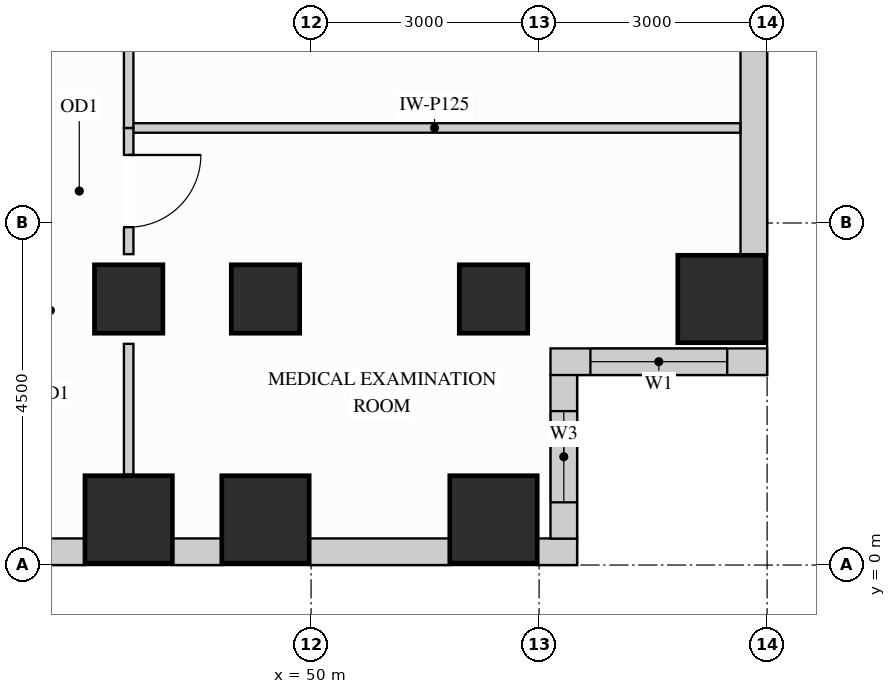
"""IFC4 building model, lengths in metres.
Left out: names, types, materials, properties, quantities, classifications, styles, units other than length and angle.
Written with IfcOpenShell. Run it as: python <this file> out.ifc"""

import sys

from ifc_helpers import new_model, si_unit, direction, frame, frame_2d, origin, origin_2d, place, context, subcontext, project, spatial, rectangle, extrude, source, transform, mapped, element, fill, save


model = new_model("IFC4")
c1 = context("Model", 3, precision=1e-05, world=origin(), true_north=direction((0.0, 1.0)))
c2 = subcontext(c1, "Body", "Model", "MODEL_VIEW")
j1 = project(units=[si_unit("LENGTHUNIT", "METRE"), si_unit("PLANEANGLEUNIT", "RADIAN")], contexts=[c1])
p1 = place(None, origin())
s1 = spatial("IfcSite", under=j1, at=p1, CompositionType="ELEMENT")
p2 = place(p1, origin())
s2 = spatial("IfcBuilding", under=s1, at=p2, CompositionType="ELEMENT")
p3 = place(p2, frame((0.0, 0.0, 117.0)))
s3 = spatial("IfcBuildingStorey", under=s2, at=p3, CompositionType="ELEMENT", Elevation=117.0)
m1 = source(origin(), c2, "Body", "SweptSolid", [
    extrude(rectangle(XDim=0.9, YDim=0.9, at=origin_2d()), origin(), (0.0, 0.0, 1.0), 3.38),
])
for number, where, z_axis, x_axis in (
    (1, (47.6, 3.5, 0.0), (0.0, 0.0, 1.0), (1.0, 0.0, 0.0)),
    (2, (49.4, 3.5, 0.0), (0.0, 0.0, 1.0), (1.0, 0.0, 0.0)),
    (3, (52.4, 3.5, 0.0), (0.0, 0.0, 1.0), (1.0, 0.0, 0.0)),
):
    element("IfcColumn", number, at=place(p3, frame(where, z_axis=z_axis, x_axis=x_axis)), inside=s3, PredefinedType="COLUMN", context=c2, shape_type="MappedRepresentation", body=[
        mapped(m1, transform((0.0, 0.0, 0.0), x_axis=(1.0, 0.0, 0.0), y_axis=(0.0, 1.0, 0.0), z_axis=(0.0, 0.0, 1.0))),
    ])
m2 = source(origin(), c2, "Body", "SweptSolid", [
    extrude(rectangle(XDim=1.15, YDim=1.15, at=origin_2d()), origin(), (0.0, 0.0, 1.0), 3.38),
])
for number, where, z_axis, x_axis in (
    (4, (55.4, 3.5, 0.0), (0.0, 0.0, 1.0), (1.0, 0.0, 0.0)),
    (5, (47.6, 0.6, 0.0), (0.0, 0.0, 1.0), (1.0, 0.0, 0.0)),
    (6, (49.4, 0.6, 0.0), (0.0, 0.0, 1.0), (1.0, 0.0, 0.0)),
    (7, (52.4, 0.6, 0.0), (0.0, 0.0, 1.0), (1.0, 0.0, 0.0)),
):
    element("IfcColumn", number, at=place(p3, frame(where, z_axis=z_axis, x_axis=x_axis)), inside=s3, PredefinedType="COLUMN", context=c2, shape_type="MappedRepresentation", body=[
        mapped(m2, transform((0.0, 0.0, 0.0), x_axis=(1.0, 0.0, 0.0), y_axis=(0.0, 1.0, 0.0), z_axis=(0.0, 0.0, 1.0))),
    ])
p4 = place(p3, frame((40.573, 0.175, 0.0), z_axis=(0.0, 0.0, 1.0), x_axis=(1.0, 0.0, 0.0)))
e8 = element("IfcWall", 8, at=p4, inside=s3, PredefinedType="SOLIDWALL", context=c2, shape_type="SweptSolid", body=[
    extrude(rectangle(XDim=6.454, YDim=0.35, at=frame_2d((3.227, 0.0))), origin(), (0.0, 0.0, 1.0), 3.365),
])
p5 = place(p4, frame((0.712, 0.0, 0.78)))
e9 = element("IfcOpeningElement", 9, at=p5, cuts=e8, PredefinedType="OPENING", context=c2, shape_type="SweptSolid", body=[
    extrude(rectangle(XDim=1.8, YDim=2.1, at=frame_2d((0.9, 1.05))), frame((0.0, 0.185, 0.0), z_axis=(0.0, -1.0, 0.0), x_axis=(1.0, 0.0, 0.0)), (0.0, 0.0, 1.0), 0.37),
])
p6 = place(p4, frame((2.905, 0.0, 0.78)))
e10 = element("IfcOpeningElement", 10, at=p6, cuts=e8, PredefinedType="OPENING", context=c2, shape_type="SweptSolid", body=[
    extrude(rectangle(XDim=1.8, YDim=2.1, at=frame_2d((0.9, 1.05))), frame((0.0, 0.185, 0.0), z_axis=(0.0, -1.0, 0.0), x_axis=(1.0, 0.0, 0.0)), (0.0, 0.0, 1.0), 0.37),
])
m3 = source(origin(), c2, "Body", "SweptSolid", [
    extrude(rectangle(XDim=0.654, YDim=0.35, at=frame_2d((0.327, 0.0))), origin(), (0.0, 0.0, 1.0), 3.365),
])
p7 = place(p3, frame((48.173, 0.175, 0.0), z_axis=(0.0, 0.0, 1.0), x_axis=(1.0, 0.0, 0.0)))
e11 = element("IfcWall", 11, at=p7, inside=s3, PredefinedType="SOLIDWALL", context=c2, shape_type="MappedRepresentation", body=[
    mapped(m3, transform((0.0, 0.0, 0.0), x_axis=(1.0, 0.0, 0.0), y_axis=(0.0, 1.0, 0.0), z_axis=(0.0, 0.0, 1.0))),
])
m4 = source(origin(), c2, "Body", "SweptSolid", [
    extrude(rectangle(XDim=1.854, YDim=0.35, at=frame_2d((0.927, 0.0))), origin(), (0.0, 0.0, 1.0), 3.365),
])
p8 = place(p3, frame((49.973, 0.175, 0.0), z_axis=(0.0, 0.0, 1.0), x_axis=(1.0, 0.0, 0.0)))
e12 = element("IfcWall", 12, at=p8, inside=s3, PredefinedType="SOLIDWALL", context=c2, shape_type="MappedRepresentation", body=[
    mapped(m4, transform((0.0, 0.0, 0.0), x_axis=(1.0, 0.0, 0.0), y_axis=(0.0, 1.0, 0.0), z_axis=(0.0, 0.0, 1.0))),
])
m5 = source(origin(), c2, "Body", "SweptSolid", [
    extrude(rectangle(XDim=0.527, YDim=0.35, at=frame_2d((0.264, 0.0))), origin(), (0.0, 0.0, 1.0), 3.365),
])
p9 = place(p3, frame((52.973, 0.175, 0.0), z_axis=(0.0, 0.0, 1.0), x_axis=(1.0, 0.0, 0.0)))
e13 = element("IfcWall", 13, at=p9, inside=s3, PredefinedType="SOLIDWALL", context=c2, shape_type="MappedRepresentation", body=[
    mapped(m5, transform((0.0, 0.0, 0.0), x_axis=(1.0, 0.0, 0.0), y_axis=(0.0, 1.0, 0.0), z_axis=(0.0, 0.0, 1.0))),
])
p10 = place(p3, frame((53.325, 0.348, 0.0), z_axis=(0.0, 0.0, 1.0), x_axis=(0.0, 1.0, 0.0)))
e14 = element("IfcWall", 14, at=p10, inside=s3, PredefinedType="SOLIDWALL", context=c2, shape_type="SweptSolid", body=[
    extrude(rectangle(XDim=2.154, YDim=0.35, at=frame_2d((1.077, 0.0))), origin(), (0.0, 0.0, 1.0), 3.365),
])
p11 = place(p10, frame((0.477, 0.0, 0.78)))
e15 = element("IfcOpeningElement", 15, at=p11, cuts=e14, PredefinedType="OPENING", context=c2, shape_type="SweptSolid", body=[
    extrude(rectangle(XDim=1.2, YDim=2.1, at=frame_2d((0.6, 1.05))), frame((0.0, 0.185, 0.0), z_axis=(0.0, -1.0, 0.0), x_axis=(1.0, 0.0, 0.0)), (0.0, 0.0, 1.0), 0.37),
])
p12 = place(p3, frame((53.15, 2.675, 0.0), z_axis=(0.0, 0.0, 1.0), x_axis=(1.0, 0.0, 0.0)))
e16 = element("IfcWall", 16, at=p12, inside=s3, PredefinedType="SOLIDWALL", context=c2, shape_type="SweptSolid", body=[
    extrude(rectangle(XDim=2.85, YDim=0.35, at=frame_2d((1.425, 0.0))), origin(), (0.0, 0.0, 1.0), 3.365),
])
p13 = place(p12, frame((0.525, 0.0, 0.78)))
e17 = element("IfcOpeningElement", 17, at=p13, cuts=e16, PredefinedType="OPENING", context=c2, shape_type="SweptSolid", body=[
    extrude(rectangle(XDim=1.8, YDim=2.1, at=frame_2d((0.9, 1.05))), frame((0.0, 0.185, 0.0), z_axis=(0.0, -1.0, 0.0), x_axis=(1.0, 0.0, 0.0)), (0.0, 0.0, 1.0), 0.37),
])
m6 = source(origin(), c2, "Body", "SweptSolid", [
    extrude(rectangle(XDim=3.354, YDim=0.35, at=frame_2d((1.677, 0.0))), origin(), (0.0, 0.0, 1.0), 3.365),
])
p14 = place(p3, frame((55.825, 4.073, 0.0), z_axis=(0.0, 0.0, 1.0), x_axis=(0.0, 1.0, 0.0)))
e18 = element("IfcWall", 18, at=p14, inside=s3, PredefinedType="SOLIDWALL", context=c2, shape_type="MappedRepresentation", body=[
    mapped(m6, transform((0.0, 0.0, 0.0), x_axis=(1.0, 0.0, 0.0), y_axis=(0.0, 1.0, 0.0), z_axis=(0.0, 0.0, 1.0))),
])
m7 = source(origin(), c2, "Body", "SweptSolid", [
    extrude(rectangle(XDim=8.048, YDim=0.125, at=frame_2d((4.024, 0.0))), origin(), (0.0, 0.0, 1.0), 3.365),
])
p15 = place(p3, frame((47.6, 5.75, 0.0), z_axis=(0.0, 0.0, 1.0), x_axis=(1.0, 0.0, 0.0)))
e19 = element("IfcWall", 19, at=p15, inside=s3, PredefinedType="PARTITIONING", context=c2, shape_type="MappedRepresentation", body=[
    mapped(m7, transform((0.0, 0.0, 0.0), x_axis=(1.0, 0.0, 0.0), y_axis=(0.0, 1.0, 0.0), z_axis=(0.0, 0.0, 1.0))),
])
p16 = place(p3, frame((47.6, 4.09, 0.0), z_axis=(0.0, 0.0, 1.0), x_axis=(0.0, 1.0, 0.0)))
e20 = element("IfcWall", 20, at=p16, inside=s3, PredefinedType="PARTITIONING", context=c2, shape_type="SweptSolid", body=[
    extrude(rectangle(XDim=1.66, YDim=0.125, at=frame_2d((0.83, 0.0))), origin(), (0.0, 0.0, 1.0), 2.677),
])
p17 = place(p16, frame((0.355, 0.0, 0.0)))
e21 = element("IfcOpeningElement", 21, at=p17, cuts=e20, PredefinedType="OPENING", context=c2, shape_type="SweptSolid", body=[
    extrude(rectangle(XDim=0.95, YDim=2.15, at=frame_2d((0.475, 1.075))), frame((0.0, 0.073, 0.0), z_axis=(0.0, -1.0, 0.0), x_axis=(1.0, 0.0, 0.0)), (0.0, 0.0, 1.0), 0.145),
])
m8 = source(origin(), c2, "Body", "SweptSolid", [
    extrude(rectangle(XDim=1.72, YDim=0.125, at=frame_2d((0.86, 0.0))), origin(), (0.0, 0.0, 1.0), 2.677),
])
p18 = place(p3, frame((47.6, 1.19, 0.0), z_axis=(0.0, 0.0, 1.0), x_axis=(0.0, 1.0, 0.0)))
e22 = element("IfcWall", 22, at=p18, inside=s3, PredefinedType="PARTITIONING", context=c2, shape_type="MappedRepresentation", body=[
    mapped(m8, transform((0.0, 0.0, 0.0), x_axis=(1.0, 0.0, 0.0), y_axis=(0.0, 1.0, 0.0), z_axis=(0.0, 0.0, 1.0))),
])
m9 = source(origin(), c2, "Body", "SweptSolid", [
    extrude(rectangle(XDim=1.66, YDim=0.125, at=frame_2d((0.83, 0.0))), origin(), (0.0, 0.0, 1.0), 2.677),
])
p19 = place(p3, frame((47.6, 5.75, 0.0), z_axis=(0.0, 0.0, 1.0), x_axis=(0.0, 1.0, 0.0)))
e23 = element("IfcWall", 23, at=p19, inside=s3, PredefinedType="PARTITIONING", context=c2, shape_type="MappedRepresentation", body=[
    mapped(m9, transform((0.0, 0.0, 0.0), x_axis=(1.0, 0.0, 0.0), y_axis=(0.0, 1.0, 0.0), z_axis=(0.0, 0.0, 1.0))),
])
m10 = source(origin(), c2, "Body", "SweptSolid", [
    extrude(rectangle(XDim=0.95, YDim=2.15, at=frame_2d((0.475, 1.075))), frame((0.0, 0.025, 0.0), z_axis=(0.0, -1.0, 0.0), x_axis=(1.0, 0.0, 0.0)), (0.0, 0.0, 1.0), 0.05),
])
p20 = place(p17, origin())
e24 = element("IfcDoor", 24, at=p20, inside=s3, OperationType="SINGLE_SWING_RIGHT", PredefinedType="DOOR", context=c2, shape_type="MappedRepresentation", body=[
    mapped(m10, transform((0.0, 0.0, 0.0), x_axis=(1.0, 0.0, 0.0), y_axis=(0.0, 1.0, 0.0), z_axis=(0.0, 0.0, 1.0))),
])
fill(e21, e24)
m11 = source(origin(), c2, "Body", "SweptSolid", [
    extrude(rectangle(XDim=1.8, YDim=2.1, at=frame_2d((0.9, 1.05))), frame((0.0, 0.03, 0.0), z_axis=(0.0, -1.0, 0.0), x_axis=(1.0, 0.0, 0.0)), (0.0, 0.0, 1.0), 0.06),
])
p21 = place(p13, origin())
e25 = element("IfcWindow", 25, at=p21, inside=s3, PartitioningType="SINGLE_PANEL", PredefinedType="WINDOW", context=c2, shape_type="MappedRepresentation", body=[
    mapped(m11, transform((0.0, 0.0, 0.0), x_axis=(1.0, 0.0, 0.0), y_axis=(0.0, 1.0, 0.0), z_axis=(0.0, 0.0, 1.0))),
])
fill(e17, e25)
m12 = source(origin(), c2, "Body", "SweptSolid", [
    extrude(rectangle(XDim=1.2, YDim=2.1, at=frame_2d((0.6, 1.05))), frame((0.0, 0.03, 0.0), z_axis=(0.0, -1.0, 0.0), x_axis=(1.0, 0.0, 0.0)), (0.0, 0.0, 1.0), 0.06),
])
p22 = place(p11, origin())
e26 = element("IfcWindow", 26, at=p22, inside=s3, PartitioningType="SINGLE_PANEL", PredefinedType="WINDOW", context=c2, shape_type="MappedRepresentation", body=[
    mapped(m12, transform((0.0, 0.0, 0.0), x_axis=(1.0, 0.0, 0.0), y_axis=(0.0, 1.0, 0.0), z_axis=(0.0, 0.0, 1.0))),
])
fill(e15, e26)
save(model, sys.argv[1])
